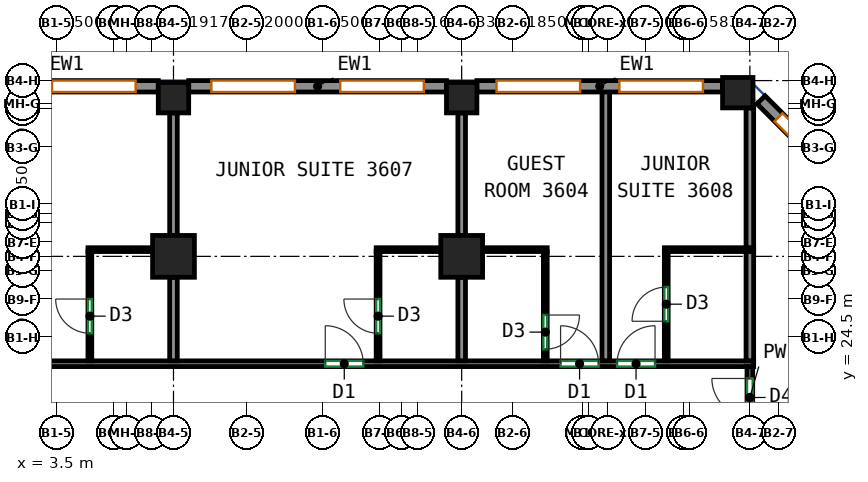
"""IFC4 building model, lengths in metres.
Left out: names, types, materials, properties, quantities, classifications, styles, units other than length and angle.
Written with IfcOpenShell. Run it as: python <this file> out.ifc"""

import sys

from ifc_helpers import new_model, si_unit, direction, frame, frame_2d, origin, origin_2d, place, context, subcontext, project, spatial, rectangle, extrude, source, transform, mapped, element, fill, save


model = new_model("IFC4")
c1 = context("Model", 3, precision=1e-05, world=origin(), true_north=direction((0.0, 1.0)))
c2 = subcontext(c1, "Body", "Model", "MODEL_VIEW")
j1 = project(units=[si_unit("LENGTHUNIT", "METRE"), si_unit("PLANEANGLEUNIT", "RADIAN")], contexts=[c1])
p1 = place(None, origin())
s1 = spatial("IfcSite", under=j1, at=p1, CompositionType="ELEMENT")
p2 = place(p1, origin())
s2 = spatial("IfcBuilding", under=s1, at=p2, CompositionType="ELEMENT")
p3 = place(p2, frame((0.0, 0.0, 157.5)))
s3 = spatial("IfcBuildingStorey", under=s2, at=p3, CompositionType="ELEMENT", Elevation=157.5)
m1 = source(origin(), c2, "Body", "SweptSolid", [
    extrude(rectangle(XDim=1.1, YDim=1.1, at=origin_2d()), origin(), (0.0, 0.0, 1.0), 3.12),
])
p4 = place(p3, frame((6.583, 26.625, 0.0), z_axis=(0.0, 0.0, 1.0), x_axis=(1.0, 0.0, 0.0)))
e1 = element("IfcColumn", 1, at=p4, inside=s3, PredefinedType="COLUMN", context=c2, shape_type="MappedRepresentation", body=[
    mapped(m1, transform((0.0, 0.0, 0.0))),
])
m2 = source(origin(), c2, "Body", "SweptSolid", [
    extrude(rectangle(XDim=0.8, YDim=0.8, at=origin_2d()), origin(), (0.0, 0.0, 1.0), 3.12),
])
p5 = place(p3, frame((6.583, 30.8, 0.0), z_axis=(0.0, 0.0, 1.0), x_axis=(1.0, 0.0, 0.0)))
e2 = element("IfcColumn", 2, at=p5, inside=s3, PredefinedType="COLUMN", context=c2, shape_type="MappedRepresentation", body=[
    mapped(m2, transform((0.0, 0.0, 0.0))),
])
p6 = place(p3, frame((14.167, 26.625, 0.0), z_axis=(0.0, 0.0, 1.0), x_axis=(1.0, 0.0, 0.0)))
e3 = element("IfcColumn", 3, at=p6, inside=s3, PredefinedType="COLUMN", context=c2, shape_type="MappedRepresentation", body=[
    mapped(m1, transform((0.0, 0.0, 0.0))),
])
for number, where, z_axis, x_axis in (
    (4, (14.167, 30.8, 0.0), (0.0, 0.0, 1.0), (1.0, 0.0, 0.0)),
    (5, (21.432, 30.932, 0.0), (0.0, 0.0, 1.0), (1.0, 0.0, 0.0)),
):
    element("IfcColumn", number, at=place(p3, frame(where, z_axis=z_axis, x_axis=x_axis)), inside=s3, PredefinedType="COLUMN", context=c2, shape_type="MappedRepresentation", body=[
        mapped(m2, transform((0.0, 0.0, 0.0))),
    ])
m3 = source(origin(), c2, "Body", "SweptSolid", [
    extrude(rectangle(XDim=3.5, YDim=0.3, at=frame_2d((1.75, 0.0))), origin(), (0.0, 0.0, 1.0), 3.12),
])
p7 = place(p3, frame((24.519, 28.269, 0.0), z_axis=(0.0, 0.0, 1.0), x_axis=(-0.70707190453, 0.707141656123, 0.0)))
e6 = element("IfcWall", 6, at=p7, inside=s3, PredefinedType="SOLIDWALL", context=c2, shape_type="MappedRepresentation", body=[
    mapped(m3, transform((0.0, 0.0, 0.0))),
])
p8 = place(p7, frame((0.65, 0.0, 0.85)))
e7 = element("IfcOpeningElement", 7, at=p8, cuts=e6, PredefinedType="OPENING", context=c2, shape_type="SweptSolid", body=[
    extrude(rectangle(XDim=2.2, YDim=1.95, at=frame_2d((1.1, 0.975))), frame((0.0, 0.16, 0.0), z_axis=(0.0, -1.0, 0.0), x_axis=(1.0, 0.0, 0.0)), (0.0, 0.0, 1.0), 0.32),
])
m4 = source(origin(), c2, "Body", "SweptSolid", [
    extrude(rectangle(XDim=6.465, YDim=0.3, at=frame_2d((3.232, 0.0))), origin(), (0.0, 0.0, 1.0), 3.12),
])
p9 = place(p3, frame((21.032, 31.1, 0.0), z_axis=(0.0, 0.0, 1.0), x_axis=(-1.0, 0.0, 0.0)))
e8 = element("IfcWall", 8, at=p9, inside=s3, PredefinedType="SOLIDWALL", context=c2, shape_type="MappedRepresentation", body=[
    mapped(m4, transform((0.0, 0.0, 0.0))),
])
p10 = place(p9, frame((0.516, 0.0, 0.85)))
e9 = element("IfcOpeningElement", 9, at=p10, cuts=e8, PredefinedType="OPENING", context=c2, shape_type="SweptSolid", body=[
    extrude(rectangle(XDim=2.2, YDim=1.95, at=frame_2d((1.1, 0.975))), frame((0.0, 0.16, 0.0), z_axis=(0.0, -1.0, 0.0), x_axis=(1.0, 0.0, 0.0)), (0.0, 0.0, 1.0), 0.32),
])
p11 = place(p9, frame((3.749, 0.0, 0.85)))
e10 = element("IfcOpeningElement", 10, at=p11, cuts=e8, PredefinedType="OPENING", context=c2, shape_type="SweptSolid", body=[
    extrude(rectangle(XDim=2.2, YDim=1.95, at=frame_2d((1.1, 0.975))), frame((0.0, 0.16, 0.0), z_axis=(0.0, -1.0, 0.0), x_axis=(1.0, 0.0, 0.0)), (0.0, 0.0, 1.0), 0.32),
])
m5 = source(origin(), c2, "Body", "SweptSolid", [
    extrude(rectangle(XDim=6.783, YDim=0.3, at=frame_2d((3.392, 0.0))), origin(), (0.0, 0.0, 1.0), 3.12),
])
p12 = place(p3, frame((13.767, 31.1, 0.0), z_axis=(0.0, 0.0, 1.0), x_axis=(-1.0, 0.0, 0.0)))
e11 = element("IfcWall", 11, at=p12, inside=s3, PredefinedType="SOLIDWALL", context=c2, shape_type="MappedRepresentation", body=[
    mapped(m5, transform((0.0, 0.0, 0.0))),
])
p13 = place(p12, frame((0.596, 0.0, 0.85)))
e12 = element("IfcOpeningElement", 12, at=p13, cuts=e11, PredefinedType="OPENING", context=c2, shape_type="SweptSolid", body=[
    extrude(rectangle(XDim=2.2, YDim=1.95, at=frame_2d((1.1, 0.975))), frame((0.0, 0.16, 0.0), z_axis=(0.0, -1.0, 0.0), x_axis=(1.0, 0.0, 0.0)), (0.0, 0.0, 1.0), 0.32),
])
p14 = place(p12, frame((3.988, 0.0, 0.85)))
e13 = element("IfcOpeningElement", 13, at=p14, cuts=e11, PredefinedType="OPENING", context=c2, shape_type="SweptSolid", body=[
    extrude(rectangle(XDim=2.2, YDim=1.95, at=frame_2d((1.1, 0.975))), frame((0.0, 0.16, 0.0), z_axis=(0.0, -1.0, 0.0), x_axis=(1.0, 0.0, 0.0)), (0.0, 0.0, 1.0), 0.32),
])
m6 = source(origin(), c2, "Body", "SweptSolid", [
    extrude(rectangle(XDim=6.783, YDim=0.3, at=frame_2d((3.392, 0.0))), origin(), (0.0, 0.0, 1.0), 3.12),
])
p15 = place(p3, frame((6.183, 31.1, 0.0), z_axis=(0.0, 0.0, 1.0), x_axis=(-1.0, 0.0, 0.0)))
e14 = element("IfcWall", 14, at=p15, inside=s3, PredefinedType="SOLIDWALL", context=c2, shape_type="MappedRepresentation", body=[
    mapped(m6, transform((0.0, 0.0, 0.0))),
])
p16 = place(p15, frame((0.596, 0.0, 0.85)))
e15 = element("IfcOpeningElement", 15, at=p16, cuts=e14, PredefinedType="OPENING", context=c2, shape_type="SweptSolid", body=[
    extrude(rectangle(XDim=2.2, YDim=1.95, at=frame_2d((1.1, 0.975))), frame((0.0, 0.16, 0.0), z_axis=(0.0, -1.0, 0.0), x_axis=(1.0, 0.0, 0.0)), (0.0, 0.0, 1.0), 0.32),
])
p17 = place(p15, frame((3.988, 0.0, 0.85)))
e16 = element("IfcOpeningElement", 16, at=p17, cuts=e14, PredefinedType="OPENING", context=c2, shape_type="SweptSolid", body=[
    extrude(rectangle(XDim=2.2, YDim=1.95, at=frame_2d((1.1, 0.975))), frame((0.0, 0.16, 0.0), z_axis=(0.0, -1.0, 0.0), x_axis=(1.0, 0.0, 0.0)), (0.0, 0.0, 1.0), 0.32),
])
p18 = place(p3, frame((-20.059, 23.8, 0.0), z_axis=(0.0, 0.0, 1.0), x_axis=(1.0, 0.0, 0.0)))
e17 = element("IfcWall", 17, at=p18, inside=s3, PredefinedType="PARTITIONING", context=c2, shape_type="SweptSolid", body=[
    extrude(rectangle(XDim=41.909, YDim=0.15, at=frame_2d((20.955, 0.0))), origin(), (0.0, 0.0, 1.0), 3.12),
])
p19 = place(p18, frame((5.293, 0.0, 0.0)))
e18 = element("IfcOpeningElement", 18, at=p19, cuts=e17, PredefinedType="OPENING", context=c2, shape_type="SweptSolid", body=[
    extrude(rectangle(XDim=1.0, YDim=2.1, at=frame_2d((0.5, 1.05))), frame((0.0, 0.085, 0.0), z_axis=(0.0, -1.0, 0.0), x_axis=(1.0, 0.0, 0.0)), (0.0, 0.0, 1.0), 0.17),
])
p20 = place(p18, frame((9.275, 0.0, 0.0)))
e19 = element("IfcOpeningElement", 19, at=p20, cuts=e17, PredefinedType="OPENING", context=c2, shape_type="SweptSolid", body=[
    extrude(rectangle(XDim=1.0, YDim=2.1, at=frame_2d((0.5, 1.05))), frame((0.0, 0.085, 0.0), z_axis=(0.0, -1.0, 0.0), x_axis=(1.0, 0.0, 0.0)), (0.0, 0.0, 1.0), 0.17),
])
p21 = place(p18, frame((18.292, 0.0, 0.0)))
e20 = element("IfcOpeningElement", 20, at=p21, cuts=e17, PredefinedType="OPENING", context=c2, shape_type="SweptSolid", body=[
    extrude(rectangle(XDim=1.0, YDim=2.1, at=frame_2d((0.5, 1.05))), frame((0.0, 0.085, 0.0), z_axis=(0.0, -1.0, 0.0), x_axis=(1.0, 0.0, 0.0)), (0.0, 0.0, 1.0), 0.17),
])
p22 = place(p18, frame((30.636, 0.0, 0.0)))
e21 = element("IfcOpeningElement", 21, at=p22, cuts=e17, PredefinedType="OPENING", context=c2, shape_type="SweptSolid", body=[
    extrude(rectangle(XDim=1.0, YDim=2.1, at=frame_2d((0.5, 1.05))), frame((0.0, 0.085, 0.0), z_axis=(0.0, -1.0, 0.0), x_axis=(1.0, 0.0, 0.0)), (0.0, 0.0, 1.0), 0.17),
])
p23 = place(p18, frame((36.828, 0.0, 0.0)))
e22 = element("IfcOpeningElement", 22, at=p23, cuts=e17, PredefinedType="OPENING", context=c2, shape_type="SweptSolid", body=[
    extrude(rectangle(XDim=1.0, YDim=2.1, at=frame_2d((0.5, 1.05))), frame((0.0, 0.085, 0.0), z_axis=(0.0, -1.0, 0.0), x_axis=(1.0, 0.0, 0.0)), (0.0, 0.0, 1.0), 0.17),
])
p24 = place(p18, frame((38.314, 0.0, 0.0)))
e23 = element("IfcOpeningElement", 23, at=p24, cuts=e17, PredefinedType="OPENING", context=c2, shape_type="SweptSolid", body=[
    extrude(rectangle(XDim=1.0, YDim=2.1, at=frame_2d((0.5, 1.05))), frame((0.0, 0.085, 0.0), z_axis=(0.0, -1.0, 0.0), x_axis=(1.0, 0.0, 0.0)), (0.0, 0.0, 1.0), 0.17),
])
p25 = place(p3, frame((21.75, 22.1, 0.0), z_axis=(0.0, 0.0, 1.0), x_axis=(0.0, 1.0, 0.0)))
e24 = element("IfcWall", 24, at=p25, inside=s3, PredefinedType="PARTITIONING", context=c2, shape_type="SweptSolid", body=[
    extrude(rectangle(XDim=1.625, YDim=0.15, at=frame_2d((0.812, 0.0))), origin(), (0.0, 0.0, 1.0), 3.12),
])
p26 = place(p25, frame((0.312, 0.0, 0.0)))
e25 = element("IfcOpeningElement", 25, at=p26, cuts=e24, PredefinedType="OPENING", context=c2, shape_type="SweptSolid", body=[
    extrude(rectangle(XDim=1.0, YDim=2.1, at=frame_2d((0.5, 1.05))), frame((0.0, 0.085, 0.0), z_axis=(0.0, -1.0, 0.0), x_axis=(1.0, 0.0, 0.0)), (0.0, 0.0, 1.0), 0.17),
])
p27 = place(p3, frame((4.333, 26.802, 0.0), z_axis=(0.0, 0.0, 1.0), x_axis=(1.0, 0.0, 0.0)))
e26 = element("IfcWall", 26, at=p27, inside=s3, PredefinedType="PARTITIONING", context=c2, shape_type="SweptSolid", body=[
    extrude(rectangle(XDim=1.7, YDim=0.1, at=frame_2d((0.85, 0.0))), origin(), (0.0, 0.0, 1.0), 3.12),
])
p28 = place(p3, frame((4.383, 23.877, 0.0), z_axis=(0.0, 0.0, 1.0), x_axis=(0.0, 1.0, 0.0)))
e27 = element("IfcWall", 27, at=p28, inside=s3, PredefinedType="PARTITIONING", context=c2, shape_type="SweptSolid", body=[
    extrude(rectangle(XDim=2.875, YDim=0.1, at=frame_2d((1.438, 0.0))), origin(), (0.0, 0.0, 1.0), 3.12),
])
p29 = place(p28, frame((0.725, 0.0, 0.0)))
e28 = element("IfcOpeningElement", 28, at=p29, cuts=e27, PredefinedType="OPENING", context=c2, shape_type="SweptSolid", body=[
    extrude(rectangle(XDim=0.9, YDim=2.1, at=frame_2d((0.45, 1.05))), frame((0.0, 0.06, 0.0), z_axis=(0.0, -1.0, 0.0), x_axis=(1.0, 0.0, 0.0)), (0.0, 0.0, 1.0), 0.12),
])
p30 = place(p3, frame((6.583, 27.175, 0.0), z_axis=(0.0, 0.0, 1.0), x_axis=(0.0, 1.0, 0.0)))
e29 = element("IfcWall", 29, at=p30, inside=s3, PredefinedType="PARTITIONING", context=c2, shape_type="SweptSolid", body=[
    extrude(rectangle(XDim=3.225, YDim=0.2, at=frame_2d((1.612, 0.0))), origin(), (0.0, 0.0, 1.0), 3.12),
])
p31 = place(p3, frame((6.583, 23.877, 0.0), z_axis=(0.0, 0.0, 1.0), x_axis=(0.0, 1.0, 0.0)))
e30 = element("IfcWall", 30, at=p31, inside=s3, PredefinedType="PARTITIONING", context=c2, shape_type="SweptSolid", body=[
    extrude(rectangle(XDim=2.198, YDim=0.2, at=frame_2d((1.099, 0.0))), origin(), (0.0, 0.0, 1.0), 3.12),
])
p32 = place(p3, frame((11.917, 26.802, 0.0), z_axis=(0.0, 0.0, 1.0), x_axis=(1.0, 0.0, 0.0)))
e31 = element("IfcWall", 31, at=p32, inside=s3, PredefinedType="PARTITIONING", context=c2, shape_type="SweptSolid", body=[
    extrude(rectangle(XDim=1.7, YDim=0.1, at=frame_2d((0.85, 0.0))), origin(), (0.0, 0.0, 1.0), 3.12),
])
p33 = place(p3, frame((11.967, 23.877, 0.0), z_axis=(0.0, 0.0, 1.0), x_axis=(0.0, 1.0, 0.0)))
e32 = element("IfcWall", 32, at=p33, inside=s3, PredefinedType="PARTITIONING", context=c2, shape_type="SweptSolid", body=[
    extrude(rectangle(XDim=2.875, YDim=0.1, at=frame_2d((1.438, 0.0))), origin(), (0.0, 0.0, 1.0), 3.12),
])
p34 = place(p33, frame((0.725, 0.0, 0.0)))
e33 = element("IfcOpeningElement", 33, at=p34, cuts=e32, PredefinedType="OPENING", context=c2, shape_type="SweptSolid", body=[
    extrude(rectangle(XDim=0.9, YDim=2.1, at=frame_2d((0.45, 1.05))), frame((0.0, 0.06, 0.0), z_axis=(0.0, -1.0, 0.0), x_axis=(1.0, 0.0, 0.0)), (0.0, 0.0, 1.0), 0.12),
])
p35 = place(p3, frame((14.167, 27.175, 0.0), z_axis=(0.0, 0.0, 1.0), x_axis=(0.0, 1.0, 0.0)))
e34 = element("IfcWall", 34, at=p35, inside=s3, PredefinedType="PARTITIONING", context=c2, shape_type="SweptSolid", body=[
    extrude(rectangle(XDim=3.225, YDim=0.2, at=frame_2d((1.612, 0.0))), origin(), (0.0, 0.0, 1.0), 3.12),
])
p36 = place(p3, frame((14.167, 23.877, 0.0), z_axis=(0.0, 0.0, 1.0), x_axis=(0.0, 1.0, 0.0)))
e35 = element("IfcWall", 35, at=p36, inside=s3, PredefinedType="PARTITIONING", context=c2, shape_type="SweptSolid", body=[
    extrude(rectangle(XDim=2.198, YDim=0.2, at=frame_2d((1.099, 0.0))), origin(), (0.0, 0.0, 1.0), 3.12),
])
p37 = place(p3, frame((14.717, 26.802, 0.0), z_axis=(0.0, 0.0, 1.0), x_axis=(1.0, 0.0, 0.0)))
e36 = element("IfcWall", 36, at=p37, inside=s3, PredefinedType="PARTITIONING", context=c2, shape_type="SweptSolid", body=[
    extrude(rectangle(XDim=1.7, YDim=0.1, at=frame_2d((0.85, 0.0))), origin(), (0.0, 0.0, 1.0), 3.12),
])
p38 = place(p3, frame((16.367, 26.752, 0.0), z_axis=(0.0, 0.0, 1.0), x_axis=(0.0, -1.0, 0.0)))
e37 = element("IfcWall", 37, at=p38, inside=s3, PredefinedType="PARTITIONING", context=c2, shape_type="SweptSolid", body=[
    extrude(rectangle(XDim=2.875, YDim=0.1, at=frame_2d((1.438, 0.0))), origin(), (0.0, 0.0, 1.0), 3.12),
])
p39 = place(p38, frame((1.67, 0.0, 0.0)))
e38 = element("IfcOpeningElement", 38, at=p39, cuts=e37, PredefinedType="OPENING", context=c2, shape_type="SweptSolid", body=[
    extrude(rectangle(XDim=0.9, YDim=2.1, at=frame_2d((0.45, 1.05))), frame((0.0, 0.06, 0.0), z_axis=(0.0, -1.0, 0.0), x_axis=(1.0, 0.0, 0.0)), (0.0, 0.0, 1.0), 0.12),
])
p40 = place(p3, frame((17.959, 23.877, 0.0), z_axis=(0.0, 0.0, 1.0), x_axis=(0.0, 1.0, 0.0)))
e39 = element("IfcWall", 39, at=p40, inside=s3, PredefinedType="PARTITIONING", context=c2, shape_type="SweptSolid", body=[
    extrude(rectangle(XDim=7.123, YDim=0.2, at=frame_2d((3.562, 0.0))), origin(), (0.0, 0.0, 1.0), 3.12),
])
p41 = place(p3, frame((19.5, 26.802, 0.0), z_axis=(0.0, 0.0, 1.0), x_axis=(1.0, 0.0, 0.0)))
e40 = element("IfcWall", 40, at=p41, inside=s3, PredefinedType="PARTITIONING", context=c2, shape_type="SweptSolid", body=[
    extrude(rectangle(XDim=2.35, YDim=0.1, at=frame_2d((1.175, 0.0))), origin(), (0.0, 0.0, 1.0), 3.12),
])
p42 = place(p3, frame((19.55, 23.877, 0.0), z_axis=(0.0, 0.0, 1.0), x_axis=(0.0, 1.0, 0.0)))
e41 = element("IfcWall", 41, at=p42, inside=s3, PredefinedType="PARTITIONING", context=c2, shape_type="SweptSolid", body=[
    extrude(rectangle(XDim=2.875, YDim=0.1, at=frame_2d((1.438, 0.0))), origin(), (0.0, 0.0, 1.0), 3.12),
])
p43 = place(p42, frame((1.04, 0.0, 0.0)))
e42 = element("IfcOpeningElement", 42, at=p43, cuts=e41, PredefinedType="OPENING", context=c2, shape_type="SweptSolid", body=[
    extrude(rectangle(XDim=0.9, YDim=2.1, at=frame_2d((0.45, 1.05))), frame((0.0, 0.06, 0.0), z_axis=(0.0, -1.0, 0.0), x_axis=(1.0, 0.0, 0.0)), (0.0, 0.0, 1.0), 0.12),
])
p44 = place(p3, frame((21.75, 26.852, 0.0), z_axis=(0.0, 0.0, 1.0), x_axis=(0.0, 1.0, 0.0)))
e43 = element("IfcWall", 43, at=p44, inside=s3, PredefinedType="PARTITIONING", context=c2, shape_type="SweptSolid", body=[
    extrude(rectangle(XDim=3.68, YDim=0.2, at=frame_2d((1.84, 0.0))), origin(), (0.0, 0.0, 1.0), 3.12),
])
p45 = place(p3, frame((21.75, 23.877, 0.0), z_axis=(0.0, 0.0, 1.0), x_axis=(0.0, 1.0, 0.0)))
e44 = element("IfcWall", 44, at=p45, inside=s3, PredefinedType="PARTITIONING", context=c2, shape_type="SweptSolid", body=[
    extrude(rectangle(XDim=2.875, YDim=0.2, at=frame_2d((1.438, 0.0))), origin(), (0.0, 0.0, 1.0), 3.12),
])
p46 = place(p8, origin())
e45 = element("IfcWindow", 45, at=p46, inside=s3, PartitioningType="SINGLE_PANEL", PredefinedType="WINDOW", context=c2, shape_type="SweptSolid", body=[
    extrude(rectangle(XDim=2.2, YDim=1.95, at=frame_2d((1.1, 0.975))), frame((0.0, 0.03, 0.0), z_axis=(0.0, -1.0, 0.0), x_axis=(1.0, 0.0, 0.0)), (0.0, 0.0, 1.0), 0.06),
])
fill(e7, e45)
p47 = place(p10, origin())
e46 = element("IfcWindow", 46, at=p47, inside=s3, PartitioningType="SINGLE_PANEL", PredefinedType="WINDOW", context=c2, shape_type="SweptSolid", body=[
    extrude(rectangle(XDim=2.2, YDim=1.95, at=frame_2d((1.1, 0.975))), frame((0.0, 0.03, 0.0), z_axis=(0.0, -1.0, 0.0), x_axis=(1.0, 0.0, 0.0)), (0.0, 0.0, 1.0), 0.06),
])
fill(e9, e46)
p48 = place(p11, origin())
e47 = element("IfcWindow", 47, at=p48, inside=s3, PartitioningType="SINGLE_PANEL", PredefinedType="WINDOW", context=c2, shape_type="SweptSolid", body=[
    extrude(rectangle(XDim=2.2, YDim=1.95, at=frame_2d((1.1, 0.975))), frame((0.0, 0.03, 0.0), z_axis=(0.0, -1.0, 0.0), x_axis=(1.0, 0.0, 0.0)), (0.0, 0.0, 1.0), 0.06),
])
fill(e10, e47)
p49 = place(p13, origin())
e48 = element("IfcWindow", 48, at=p49, inside=s3, PartitioningType="SINGLE_PANEL", PredefinedType="WINDOW", context=c2, shape_type="SweptSolid", body=[
    extrude(rectangle(XDim=2.2, YDim=1.95, at=frame_2d((1.1, 0.975))), frame((0.0, 0.03, 0.0), z_axis=(0.0, -1.0, 0.0), x_axis=(1.0, 0.0, 0.0)), (0.0, 0.0, 1.0), 0.06),
])
fill(e12, e48)
p50 = place(p14, origin())
e49 = element("IfcWindow", 49, at=p50, inside=s3, PartitioningType="SINGLE_PANEL", PredefinedType="WINDOW", context=c2, shape_type="SweptSolid", body=[
    extrude(rectangle(XDim=2.2, YDim=1.95, at=frame_2d((1.1, 0.975))), frame((0.0, 0.03, 0.0), z_axis=(0.0, -1.0, 0.0), x_axis=(1.0, 0.0, 0.0)), (0.0, 0.0, 1.0), 0.06),
])
fill(e13, e49)
p51 = place(p16, origin())
e50 = element("IfcWindow", 50, at=p51, inside=s3, PartitioningType="SINGLE_PANEL", PredefinedType="WINDOW", context=c2, shape_type="SweptSolid", body=[
    extrude(rectangle(XDim=2.2, YDim=1.95, at=frame_2d((1.1, 0.975))), frame((0.0, 0.03, 0.0), z_axis=(0.0, -1.0, 0.0), x_axis=(1.0, 0.0, 0.0)), (0.0, 0.0, 1.0), 0.06),
])
fill(e15, e50)
p52 = place(p26, origin())
e51 = element("IfcDoor", 51, at=p52, inside=s3, OperationType="SINGLE_SWING_RIGHT", PredefinedType="DOOR", context=c2, shape_type="SweptSolid", body=[
    extrude(rectangle(XDim=1.0, YDim=2.1, at=frame_2d((0.5, 1.05))), frame((0.0, 0.025, 0.0), z_axis=(0.0, -1.0, 0.0), x_axis=(1.0, 0.0, 0.0)), (0.0, 0.0, 1.0), 0.05),
])
fill(e25, e51)
p53 = place(p22, origin())
e52 = element("IfcDoor", 52, at=p53, inside=s3, OperationType="SINGLE_SWING_LEFT", PredefinedType="DOOR", context=c2, shape_type="SweptSolid", body=[
    extrude(rectangle(XDim=1.0, YDim=2.1, at=frame_2d((0.5, 1.05))), frame((0.0, 0.025, 0.0), z_axis=(0.0, -1.0, 0.0), x_axis=(1.0, 0.0, 0.0)), (0.0, 0.0, 1.0), 0.05),
])
fill(e21, e52)
p54 = place(p23, origin())
e53 = element("IfcDoor", 53, at=p54, inside=s3, OperationType="SINGLE_SWING_LEFT", PredefinedType="DOOR", context=c2, shape_type="SweptSolid", body=[
    extrude(rectangle(XDim=1.0, YDim=2.1, at=frame_2d((0.5, 1.05))), frame((0.0, 0.025, 0.0), z_axis=(0.0, -1.0, 0.0), x_axis=(1.0, 0.0, 0.0)), (0.0, 0.0, 1.0), 0.05),
])
fill(e22, e53)
p55 = place(p24, origin())
e54 = element("IfcDoor", 54, at=p55, inside=s3, OperationType="SINGLE_SWING_RIGHT", PredefinedType="DOOR", context=c2, shape_type="SweptSolid", body=[
    extrude(rectangle(XDim=1.0, YDim=2.1, at=frame_2d((0.5, 1.05))), frame((0.0, 0.025, 0.0), z_axis=(0.0, -1.0, 0.0), x_axis=(1.0, 0.0, 0.0)), (0.0, 0.0, 1.0), 0.05),
])
fill(e23, e54)
p56 = place(p39, origin())
e55 = element("IfcDoor", 55, at=p56, inside=s3, OperationType="SINGLE_SWING_LEFT", PredefinedType="DOOR", context=c2, shape_type="SweptSolid", body=[
    extrude(rectangle(XDim=0.9, YDim=2.1, at=frame_2d((0.45, 1.05))), frame((0.0, 0.025, 0.0), z_axis=(0.0, -1.0, 0.0), x_axis=(1.0, 0.0, 0.0)), (0.0, 0.0, 1.0), 0.05),
])
fill(e38, e55)
p57 = place(p29, origin())
e56 = element("IfcDoor", 56, at=p57, inside=s3, OperationType="SINGLE_SWING_RIGHT", PredefinedType="DOOR", context=c2, shape_type="SweptSolid", body=[
    extrude(rectangle(XDim=0.9, YDim=2.1, at=frame_2d((0.45, 1.05))), frame((0.0, 0.025, 0.0), z_axis=(0.0, -1.0, 0.0), x_axis=(1.0, 0.0, 0.0)), (0.0, 0.0, 1.0), 0.05),
])
fill(e28, e56)
p58 = place(p34, origin())
e57 = element("IfcDoor", 57, at=p58, inside=s3, OperationType="SINGLE_SWING_RIGHT", PredefinedType="DOOR", context=c2, shape_type="SweptSolid", body=[
    extrude(rectangle(XDim=0.9, YDim=2.1, at=frame_2d((0.45, 1.05))), frame((0.0, 0.025, 0.0), z_axis=(0.0, -1.0, 0.0), x_axis=(1.0, 0.0, 0.0)), (0.0, 0.0, 1.0), 0.05),
])
fill(e33, e57)
p59 = place(p43, origin())
e58 = element("IfcDoor", 58, at=p59, inside=s3, OperationType="SINGLE_SWING_LEFT", PredefinedType="DOOR", context=c2, shape_type="SweptSolid", body=[
    extrude(rectangle(XDim=0.9, YDim=2.1, at=frame_2d((0.45, 1.05))), frame((0.0, 0.025, 0.0), z_axis=(0.0, -1.0, 0.0), x_axis=(1.0, 0.0, 0.0)), (0.0, 0.0, 1.0), 0.05),
])
fill(e42, e58)
save(model, sys.argv[1])
